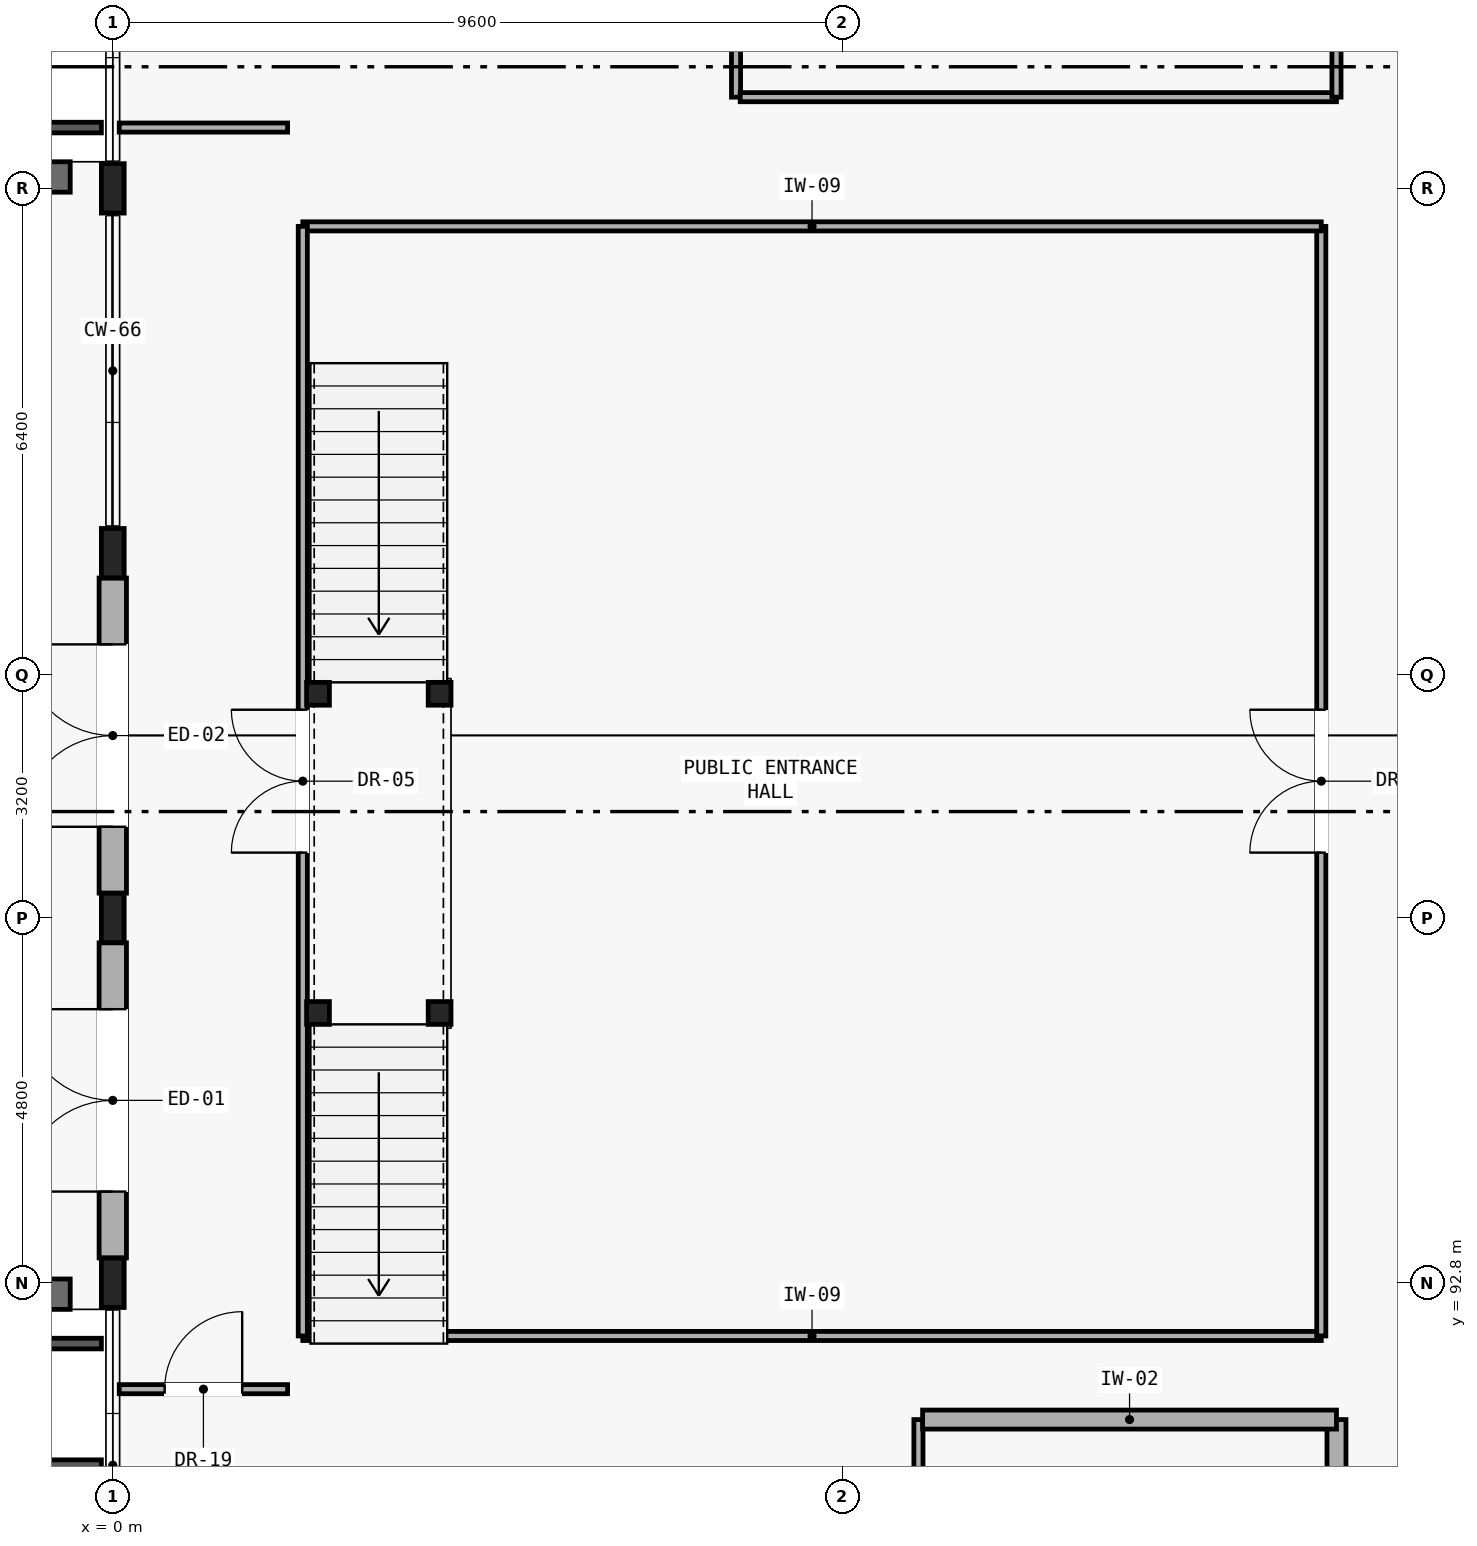
"""IFC4 building model, lengths in metres.
Left out: names, types, materials, properties, quantities, classifications, styles, units other than length and angle.
Written with IfcOpenShell. Run it as: python <this file> out.ifc"""

import sys

from ifc_helpers import new_model, si_unit, direction, frame, frame_2d, origin, origin_2d, place, context, subcontext, project, spatial, rectangle, i_section, extrude, element, fill, save


model = new_model("IFC4")
c1 = context("Model", 3, precision=1e-05, world=origin(), true_north=direction((0.0, 1.0)))
c2 = subcontext(c1, "Body", "Model", "MODEL_VIEW")
j1 = project(units=[si_unit("LENGTHUNIT", "METRE"), si_unit("PLANEANGLEUNIT", "RADIAN")], contexts=[c1])
p1 = place(None, origin())
s1 = spatial("IfcSite", under=j1, at=p1, CompositionType="ELEMENT")
p2 = place(p1, origin())
s2 = spatial("IfcBuilding", under=s1, at=p2, CompositionType="ELEMENT")
p3 = place(p2, origin())
s3 = spatial("IfcBuildingStorey", under=s2, at=p3, CompositionType="ELEMENT", Elevation=0.0)
for number, where, z_axis, x_axis in (
    (1, (0.0, 92.8, 0.0), (0.0, 0.0, 1.0), (1.0, 0.0, 0.0)),
    (2, (0.0, 97.6, 0.0), (0.0, 0.0, 1.0), (1.0, 0.0, 0.0)),
    (3, (0.0, 102.4, 0.0), (0.0, 0.0, 1.0), (1.0, 0.0, 0.0)),
    (4, (0.0, 107.2, 0.0), (0.0, 0.0, 1.0), (1.0, 0.0, 0.0)),
):
    element("IfcColumn", number, at=place(p3, frame(where, z_axis=z_axis, x_axis=x_axis)), inside=s3, PredefinedType="COLUMN", context=c2, shape_type="SweptSolid", body=[
        extrude(i_section(OverallWidth=0.3, OverallDepth=0.65, WebThickness=0.016, FlangeThickness=0.031, FilletRadius=0.027, at=origin_2d()), origin(), (0.0, 0.0, 1.0), 5.25),
    ])
p4 = place(p3, frame((-5.25, 92.65, -1.55), z_axis=(0.0, 0.0, 1.0), x_axis=(1.0, 0.0, 0.0)))
e5 = element("IfcWall", 5, at=p4, inside=s3, PredefinedType="USERDEFINED", context=c2, shape_type="SweptSolid", body=[
    extrude(rectangle(XDim=4.69, YDim=0.4, at=frame_2d((2.345, 0.0))), origin(), (0.0, 0.0, 1.0), 1.29),
])
p5 = place(p3, frame((-4.32, 107.35, -1.55), z_axis=(0.0, 0.0, 1.0), x_axis=(1.0, 0.0, 0.0)))
e6 = element("IfcWall", 6, at=p5, inside=s3, PredefinedType="USERDEFINED", context=c2, shape_type="SweptSolid", body=[
    extrude(rectangle(XDim=3.76, YDim=0.4, at=frame_2d((1.88, 0.0))), origin(), (0.0, 0.0, 1.0), 1.29),
])
p6 = place(p3, frame((0.0, 93.127, 0.0), z_axis=(0.0, 0.0, 1.0), x_axis=(0.0, 1.0, 0.0)))
e7 = element("IfcWall", 7, at=p6, inside=s3, PredefinedType="SOLIDWALL", context=c2, shape_type="SweptSolid", body=[
    extrude(rectangle(XDim=4.146, YDim=0.36, at=frame_2d((2.073, 0.0))), origin(), (0.0, 0.0, 1.0), 4.44),
])
p7 = place(p6, frame((0.873, 0.0, 0.0)))
e8 = element("IfcOpeningElement", 8, at=p7, cuts=e7, PredefinedType="OPENING", context=c2, shape_type="SweptSolid", body=[
    extrude(rectangle(XDim=2.4, YDim=2.5, at=frame_2d((1.2, 1.25))), frame((0.0, 0.19, 0.0), z_axis=(0.0, -1.0, 0.0), x_axis=(1.0, 0.0, 0.0)), (0.0, 0.0, 1.0), 0.38),
])
p8 = place(p3, frame((0.0, 97.927, 0.0), z_axis=(0.0, 0.0, 1.0), x_axis=(0.0, 1.0, 0.0)))
e9 = element("IfcWall", 9, at=p8, inside=s3, PredefinedType="SOLIDWALL", context=c2, shape_type="SweptSolid", body=[
    extrude(rectangle(XDim=4.146, YDim=0.36, at=frame_2d((2.073, 0.0))), origin(), (0.0, 0.0, 1.0), 4.44),
])
p9 = place(p8, frame((0.873, 0.0, 0.0)))
e10 = element("IfcOpeningElement", 10, at=p9, cuts=e9, PredefinedType="OPENING", context=c2, shape_type="SweptSolid", body=[
    extrude(rectangle(XDim=2.4, YDim=2.5, at=frame_2d((1.2, 1.25))), frame((0.0, 0.19, 0.0), z_axis=(0.0, -1.0, 0.0), x_axis=(1.0, 0.0, 0.0)), (0.0, 0.0, 1.0), 0.38),
])
for number, where, z_axis, x_axis in (
    (11, (2.7, 96.35, 0.0), (0.0, 0.0, 1.0), (1.0, 0.0, 0.0)),
    (12, (4.3, 96.35, 0.0), (0.0, 0.0, 1.0), (1.0, 0.0, 0.0)),
    (13, (2.7, 100.55, 0.0), (0.0, 0.0, 1.0), (1.0, 0.0, 0.0)),
    (14, (4.3, 100.55, 0.0), (0.0, 0.0, 1.0), (1.0, 0.0, 0.0)),
):
    element("IfcColumn", number, at=place(p3, frame(where, z_axis=z_axis, x_axis=x_axis)), inside=s3, PredefinedType="COLUMN", context=c2, shape_type="SweptSolid", body=[
        extrude(i_section(OverallWidth=0.3, OverallDepth=0.3, WebThickness=0.011, FlangeThickness=0.019, FilletRadius=0.027, at=origin_2d()), origin(), (0.0, 0.0, 1.0), 2.425),
    ])
p10 = place(p3, frame((2.5, 92.1, 0.0), z_axis=(0.0, 0.0, 1.0), x_axis=(1.0, 0.0, 0.0)))
e15 = element("IfcWall", 15, at=p10, inside=s3, PredefinedType="PARTITIONING", context=c2, shape_type="SweptSolid", body=[
    extrude(rectangle(XDim=13.4, YDim=0.12, at=frame_2d((6.7, 0.0))), origin(), (0.0, 0.0, 1.0), 5.0),
])
p11 = place(p3, frame((15.9, 92.1, 0.0), z_axis=(0.0, 0.0, 1.0), x_axis=(0.0, 1.0, 0.0)))
e16 = element("IfcWall", 16, at=p11, inside=s3, PredefinedType="PARTITIONING", context=c2, shape_type="SweptSolid", body=[
    extrude(rectangle(XDim=14.6, YDim=0.12, at=frame_2d((7.3, 0.0))), origin(), (0.0, 0.0, 1.0), 5.0),
])
p12 = place(p11, frame((6.36, 0.0, 0.0)))
e17 = element("IfcOpeningElement", 17, at=p12, cuts=e16, PredefinedType="OPENING", context=c2, shape_type="SweptSolid", body=[
    extrude(rectangle(XDim=1.88, YDim=2.25, at=frame_2d((0.94, 1.125))), frame((0.0, 0.07, 0.0), z_axis=(0.0, -1.0, 0.0), x_axis=(1.0, 0.0, 0.0)), (0.0, 0.0, 1.0), 0.14),
])
p13 = place(p3, frame((15.9, 106.7, 0.0), z_axis=(0.0, 0.0, 1.0), x_axis=(-1.0, 0.0, 0.0)))
e18 = element("IfcWall", 18, at=p13, inside=s3, PredefinedType="PARTITIONING", context=c2, shape_type="SweptSolid", body=[
    extrude(rectangle(XDim=13.4, YDim=0.12, at=frame_2d((6.7, 0.0))), origin(), (0.0, 0.0, 1.0), 5.0),
])
p14 = place(p3, frame((2.5, 106.7, 0.0), z_axis=(0.0, 0.0, 1.0), x_axis=(0.0, -1.0, 0.0)))
e19 = element("IfcWall", 19, at=p14, inside=s3, PredefinedType="PARTITIONING", context=c2, shape_type="SweptSolid", body=[
    extrude(rectangle(XDim=14.6, YDim=0.12, at=frame_2d((7.3, 0.0))), origin(), (0.0, 0.0, 1.0), 5.0),
])
p15 = place(p14, frame((6.36, 0.0, 0.0)))
e20 = element("IfcOpeningElement", 20, at=p15, cuts=e19, PredefinedType="OPENING", context=c2, shape_type="SweptSolid", body=[
    extrude(rectangle(XDim=1.88, YDim=2.25, at=frame_2d((0.94, 1.125))), frame((0.0, 0.07, 0.0), z_axis=(0.0, -1.0, 0.0), x_axis=(1.0, 0.0, 0.0)), (0.0, 0.0, 1.0), 0.14),
])
p16 = place(p3, frame((0.085, 91.4, 0.0), z_axis=(0.0, 0.0, 1.0), x_axis=(1.0, 0.0, 0.0)))
e21 = element("IfcWall", 21, at=p16, inside=s3, PredefinedType="PARTITIONING", context=c2, shape_type="SweptSolid", body=[
    extrude(rectangle(XDim=2.215, YDim=0.12, at=frame_2d((1.107, 0.0))), origin(), (0.0, 0.0, 1.0), 5.0),
])
p17 = place(p16, frame((0.597, 0.0, 0.0)))
e22 = element("IfcOpeningElement", 22, at=p17, cuts=e21, PredefinedType="OPENING", context=c2, shape_type="SweptSolid", body=[
    extrude(rectangle(XDim=1.02, YDim=2.1, at=frame_2d((0.51, 1.05))), frame((0.0, 0.07, 0.0), z_axis=(0.0, -1.0, 0.0), x_axis=(1.0, 0.0, 0.0)), (0.0, 0.0, 1.0), 0.14),
])
p18 = place(p3, frame((2.3, 108.0, 0.0), z_axis=(0.0, 0.0, 1.0), x_axis=(-1.0, 0.0, 0.0)))
e23 = element("IfcWall", 23, at=p18, inside=s3, PredefinedType="PARTITIONING", context=c2, shape_type="SweptSolid", body=[
    extrude(rectangle(XDim=2.215, YDim=0.12, at=frame_2d((1.107, 0.0))), origin(), (0.0, 0.0, 1.0), 5.0),
])
p19 = place(p3, frame((10.6, 83.4, 0.0), z_axis=(0.0, 0.0, 1.0), x_axis=(0.0, 1.0, 0.0)))
e24 = element("IfcWall", 24, at=p19, inside=s3, PredefinedType="PARTITIONING", context=c2, shape_type="SweptSolid", body=[
    extrude(rectangle(XDim=7.6, YDim=0.12, at=frame_2d((3.8, 0.0))), origin(), (0.0, 0.0, 1.0), 5.0),
])
p20 = place(p3, frame((16.1, 83.4, 0.0), z_axis=(0.0, 0.0, 1.0), x_axis=(0.0, 1.0, 0.0)))
e25 = element("IfcWall", 25, at=p20, inside=s3, PredefinedType="SOLIDWALL", context=c2, shape_type="SweptSolid", body=[
    extrude(rectangle(XDim=7.6, YDim=0.25, at=frame_2d((3.8, 0.0))), origin(), (0.0, 0.0, 1.0), 5.0),
])
p21 = place(p20, frame((2.96, 0.0, 0.0)))
e26 = element("IfcOpeningElement", 26, at=p21, cuts=e25, PredefinedType="OPENING", context=c2, shape_type="SweptSolid", body=[
    extrude(rectangle(XDim=1.68, YDim=2.2, at=frame_2d((0.84, 1.1))), frame((0.0, 0.135, 0.0), z_axis=(0.0, -1.0, 0.0), x_axis=(1.0, 0.0, 0.0)), (0.0, 0.0, 1.0), 0.27),
])
p22 = place(p3, frame((16.1, 91.0, 0.0), z_axis=(0.0, 0.0, 1.0), x_axis=(-1.0, 0.0, 0.0)))
e27 = element("IfcWall", 27, at=p22, inside=s3, PredefinedType="SOLIDWALL", context=c2, shape_type="SweptSolid", body=[
    extrude(rectangle(XDim=5.445, YDim=0.25, at=frame_2d((2.723, 0.0))), origin(), (0.0, 0.0, 1.0), 5.0),
])
p23 = place(p3, frame((8.2, 108.4, 0.0), z_axis=(0.0, 0.0, 1.0), x_axis=(0.0, 1.0, 0.0)))
e28 = element("IfcWall", 28, at=p23, inside=s3, PredefinedType="PARTITIONING", context=c2, shape_type="SweptSolid", body=[
    extrude(rectangle(XDim=4.0, YDim=0.12, at=frame_2d((2.0, 0.0))), origin(), (0.0, 0.0, 1.0), 5.0),
])
p24 = place(p3, frame((8.255, 108.4, 0.0), z_axis=(0.0, 0.0, 1.0), x_axis=(1.0, 0.0, 0.0)))
e29 = element("IfcWall", 29, at=p24, inside=s3, PredefinedType="PARTITIONING", context=c2, shape_type="SweptSolid", body=[
    extrude(rectangle(XDim=7.845, YDim=0.12, at=frame_2d((3.923, 0.0))), origin(), (0.0, 0.0, 1.0), 5.0),
])
p25 = place(p3, frame((16.1, 108.4, 0.0), z_axis=(0.0, 0.0, 1.0), x_axis=(0.0, 1.0, 0.0)))
e30 = element("IfcWall", 30, at=p25, inside=s3, PredefinedType="PARTITIONING", context=c2, shape_type="SweptSolid", body=[
    extrude(rectangle(XDim=4.0, YDim=0.12, at=frame_2d((2.0, 0.0))), origin(), (0.0, 0.0, 1.0), 5.0),
])
p26 = place(p7, origin())
e31 = element("IfcDoor", 31, at=p26, inside=s3, OperationType="SINGLE_SWING_LEFT", PredefinedType="DOOR", context=c2, shape_type="SweptSolid", body=[
    extrude(rectangle(XDim=2.4, YDim=2.5, at=frame_2d((1.2, 1.25))), frame((0.0, 0.025, 0.0), z_axis=(0.0, -1.0, 0.0), x_axis=(1.0, 0.0, 0.0)), (0.0, 0.0, 1.0), 0.05),
])
fill(e8, e31)
p27 = place(p9, origin())
e32 = element("IfcDoor", 32, at=p27, inside=s3, OperationType="SINGLE_SWING_LEFT", PredefinedType="DOOR", context=c2, shape_type="SweptSolid", body=[
    extrude(rectangle(XDim=2.4, YDim=2.5, at=frame_2d((1.2, 1.25))), frame((0.0, 0.025, 0.0), z_axis=(0.0, -1.0, 0.0), x_axis=(1.0, 0.0, 0.0)), (0.0, 0.0, 1.0), 0.05),
])
fill(e10, e32)
p28 = place(p12, origin())
e33 = element("IfcDoor", 33, at=p28, inside=s3, OperationType="DOUBLE_DOOR_SINGLE_SWING", PredefinedType="DOOR", context=c2, shape_type="SweptSolid", body=[
    extrude(rectangle(XDim=1.88, YDim=2.25, at=frame_2d((0.94, 1.125))), frame((0.0, 0.025, 0.0), z_axis=(0.0, -1.0, 0.0), x_axis=(1.0, 0.0, 0.0)), (0.0, 0.0, 1.0), 0.05),
])
fill(e17, e33)
p29 = place(p15, frame((1.88, 0.0, 0.0), z_axis=(0.0, 0.0, 1.0), x_axis=(-1.0, 0.0, 0.0)))
e34 = element("IfcDoor", 34, at=p29, inside=s3, OperationType="DOUBLE_DOOR_SINGLE_SWING", PredefinedType="DOOR", context=c2, shape_type="SweptSolid", body=[
    extrude(rectangle(XDim=1.88, YDim=2.25, at=frame_2d((0.94, 1.125))), frame((0.0, 0.025, 0.0), z_axis=(0.0, -1.0, 0.0), x_axis=(1.0, 0.0, 0.0)), (0.0, 0.0, 1.0), 0.05),
])
fill(e20, e34)
p30 = place(p17, origin())
e35 = element("IfcDoor", 35, at=p30, inside=s3, OperationType="SINGLE_SWING_RIGHT", PredefinedType="DOOR", context=c2, shape_type="SweptSolid", body=[
    extrude(rectangle(XDim=1.02, YDim=2.1, at=frame_2d((0.51, 1.05))), frame((0.0, 0.025, 0.0), z_axis=(0.0, -1.0, 0.0), x_axis=(1.0, 0.0, 0.0)), (0.0, 0.0, 1.0), 0.05),
])
fill(e22, e35)
save(model, sys.argv[1])
